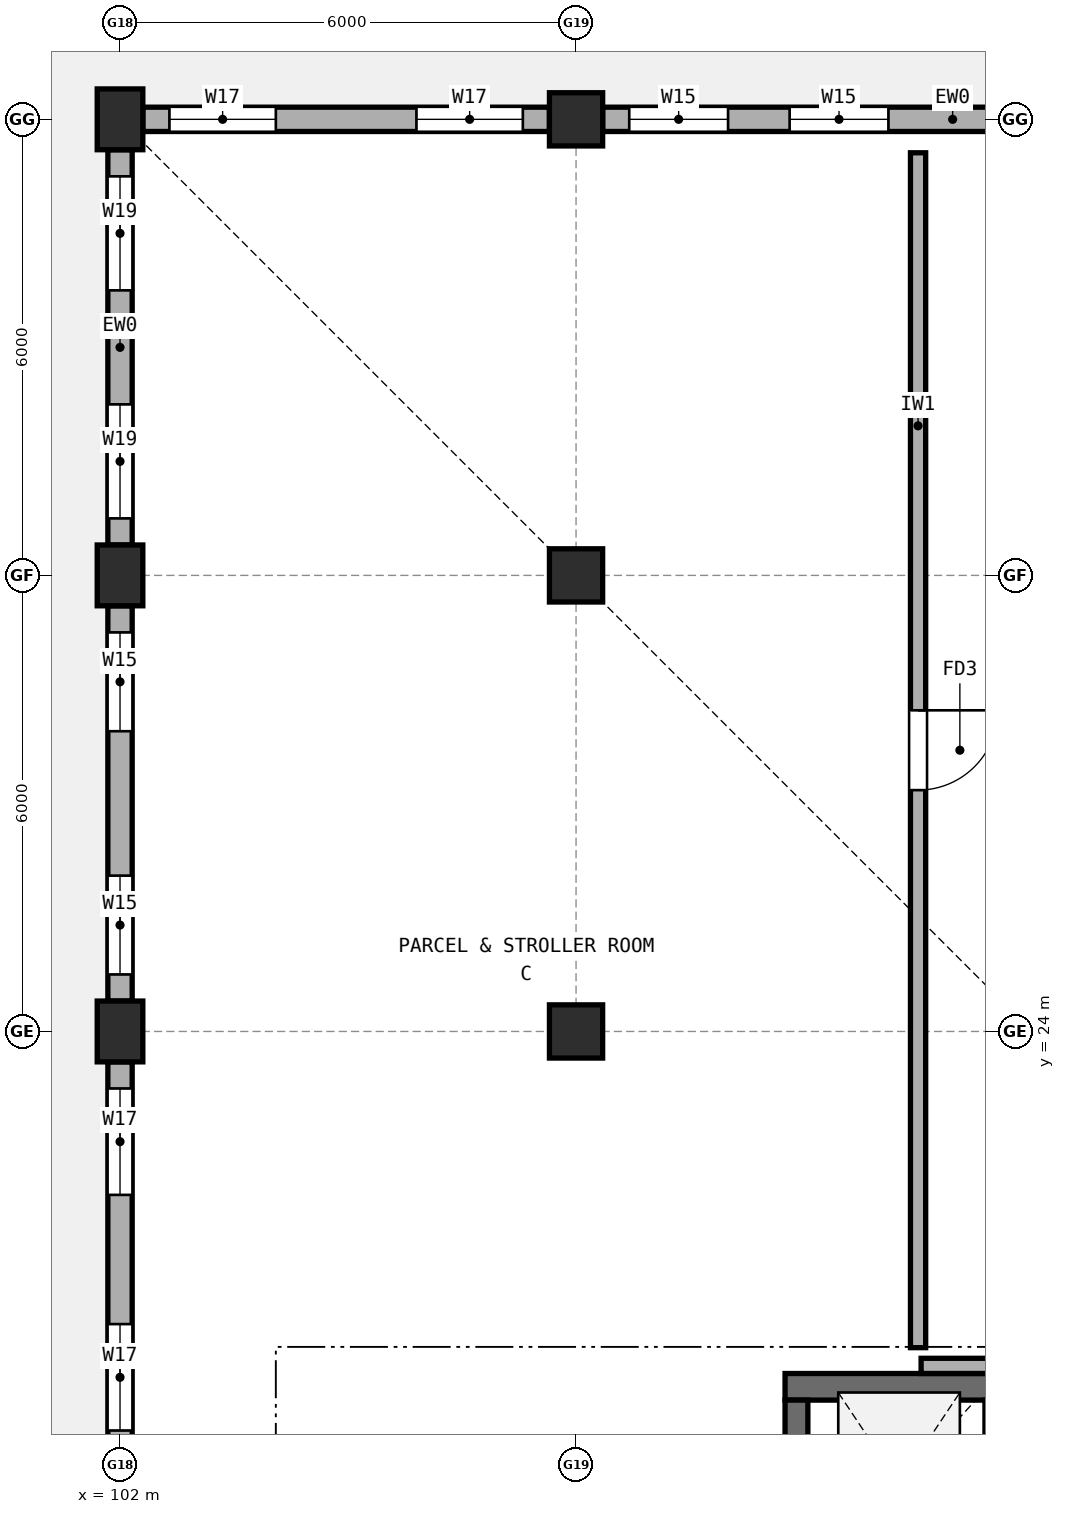
"""IFC4 building model, lengths in metres.
Left out: names, types, materials, properties, quantities, classifications, styles, units other than length and angle.
Written with IfcOpenShell. Run it as: python <this file> out.ifc"""

import sys

from ifc_helpers import new_model, si_unit, direction, frame, frame_2d, origin, origin_2d, place, context, subcontext, project, spatial, rectangle, extrude, element, fill, save


model = new_model("IFC4")
c1 = context("Model", 3, precision=1e-05, world=origin(), true_north=direction((0.0, 1.0)))
c2 = subcontext(c1, "Body", "Model", "MODEL_VIEW")
j1 = project(units=[si_unit("LENGTHUNIT", "METRE"), si_unit("PLANEANGLEUNIT", "RADIAN")], contexts=[c1])
p1 = place(None, origin())
s1 = spatial("IfcSite", under=j1, at=p1, CompositionType="ELEMENT")
p2 = place(p1, origin())
s2 = spatial("IfcBuilding", under=s1, at=p2, CompositionType="ELEMENT")
p3 = place(p2, origin())
s3 = spatial("IfcBuildingStorey", under=s2, at=p3, CompositionType="ELEMENT", Elevation=0.0)
for number, where, z_axis, x_axis in (
    (1, (102.0, 24.0, 0.0), (0.0, 0.0, 1.0), (1.0, 0.0, 0.0)),
    (2, (102.0, 30.0, 0.0), (0.0, 0.0, 1.0), (1.0, 0.0, 0.0)),
    (3, (102.0, 36.0, 0.0), (0.0, 0.0, 1.0), (1.0, 0.0, 0.0)),
):
    element("IfcColumn", number, at=place(p3, frame(where, z_axis=z_axis, x_axis=x_axis)), inside=s3, PredefinedType="COLUMN", context=c2, shape_type="SweptSolid", body=[
        extrude(rectangle(XDim=0.6, YDim=0.8, at=origin_2d()), origin(), (0.0, 0.0, 1.0), 4.23),
    ])
for number, where, z_axis, x_axis in (
    (4, (108.0, 24.0, 0.0), (0.0, 0.0, 1.0), (1.0, 0.0, 0.0)),
    (5, (108.0, 30.0, 0.0), (0.0, 0.0, 1.0), (1.0, 0.0, 0.0)),
    (6, (108.0, 36.0, 0.0), (0.0, 0.0, 1.0), (1.0, 0.0, 0.0)),
):
    element("IfcColumn", number, at=place(p3, frame(where, z_axis=z_axis, x_axis=x_axis)), inside=s3, PredefinedType="COLUMN", context=c2, shape_type="SweptSolid", body=[
        extrude(rectangle(XDim=0.7, YDim=0.7, at=origin_2d()), origin(), (0.0, 0.0, 1.0), 4.23),
    ])
p4 = place(p3, frame((113.65, 36.0, 0.0), z_axis=(0.0, 0.0, 1.0), x_axis=(-1.0, 0.0, 0.0)))
e7 = element("IfcWall", 7, at=p4, inside=s3, PredefinedType="STANDARD", context=c2, shape_type="SweptSolid", body=[
    extrude(rectangle(XDim=5.3, YDim=0.32, at=frame_2d((2.65, 0.0))), origin(), (0.0, 0.0, 1.0), 3.112),
])
p5 = place(p4, frame((1.54, 0.0, 0.9)))
e8 = element("IfcOpeningElement", 8, at=p5, cuts=e7, PredefinedType="OPENING", context=c2, shape_type="SweptSolid", body=[
    extrude(rectangle(XDim=1.3, YDim=1.45, at=frame_2d((0.65, 0.725))), frame((0.0, 0.17, 0.0), z_axis=(0.0, -1.0, 0.0), x_axis=(1.0, 0.0, 0.0)), (0.0, 0.0, 1.0), 0.34),
])
p6 = place(p4, frame((3.65, 0.0, 0.9)))
e9 = element("IfcOpeningElement", 9, at=p6, cuts=e7, PredefinedType="OPENING", context=c2, shape_type="SweptSolid", body=[
    extrude(rectangle(XDim=1.3, YDim=1.45, at=frame_2d((0.65, 0.725))), frame((0.0, 0.17, 0.0), z_axis=(0.0, -1.0, 0.0), x_axis=(1.0, 0.0, 0.0)), (0.0, 0.0, 1.0), 0.34),
])
p7 = place(p3, frame((107.65, 36.0, 0.0), z_axis=(0.0, 0.0, 1.0), x_axis=(-1.0, 0.0, 0.0)))
e10 = element("IfcWall", 10, at=p7, inside=s3, PredefinedType="STANDARD", context=c2, shape_type="SweptSolid", body=[
    extrude(rectangle(XDim=5.35, YDim=0.32, at=frame_2d((2.675, 0.0))), origin(), (0.0, 0.0, 1.0), 3.112),
])
p8 = place(p7, frame((0.35, 0.0, 0.9)))
e11 = element("IfcOpeningElement", 11, at=p8, cuts=e10, PredefinedType="OPENING", context=c2, shape_type="SweptSolid", body=[
    extrude(rectangle(XDim=1.4, YDim=1.5, at=frame_2d((0.7, 0.75))), frame((0.0, 0.17, 0.0), z_axis=(0.0, -1.0, 0.0), x_axis=(1.0, 0.0, 0.0)), (0.0, 0.0, 1.0), 0.34),
])
p9 = place(p7, frame((3.6, 0.0, 0.9)))
e12 = element("IfcOpeningElement", 12, at=p9, cuts=e10, PredefinedType="OPENING", context=c2, shape_type="SweptSolid", body=[
    extrude(rectangle(XDim=1.4, YDim=1.5, at=frame_2d((0.7, 0.75))), frame((0.0, 0.17, 0.0), z_axis=(0.0, -1.0, 0.0), x_axis=(1.0, 0.0, 0.0)), (0.0, 0.0, 1.0), 0.34),
])
p10 = place(p3, frame((102.0, 35.6, 0.0), z_axis=(0.0, 0.0, 1.0), x_axis=(0.0, -1.0, 0.0)))
e13 = element("IfcWall", 13, at=p10, inside=s3, PredefinedType="STANDARD", context=c2, shape_type="SweptSolid", body=[
    extrude(rectangle(XDim=5.2, YDim=0.32, at=frame_2d((2.6, 0.0))), origin(), (0.0, 0.0, 1.0), 3.712),
])
p11 = place(p10, frame((0.35, 0.0, 0.9)))
e14 = element("IfcOpeningElement", 14, at=p11, cuts=e13, PredefinedType="OPENING", context=c2, shape_type="SweptSolid", body=[
    extrude(rectangle(XDim=1.5, YDim=1.5, at=frame_2d((0.75, 0.75))), frame((0.0, 0.17, 0.0), z_axis=(0.0, -1.0, 0.0), x_axis=(1.0, 0.0, 0.0)), (0.0, 0.0, 1.0), 0.34),
])
p12 = place(p10, frame((3.35, 0.0, 0.9)))
e15 = element("IfcOpeningElement", 15, at=p12, cuts=e13, PredefinedType="OPENING", context=c2, shape_type="SweptSolid", body=[
    extrude(rectangle(XDim=1.5, YDim=1.5, at=frame_2d((0.75, 0.75))), frame((0.0, 0.17, 0.0), z_axis=(0.0, -1.0, 0.0), x_axis=(1.0, 0.0, 0.0)), (0.0, 0.0, 1.0), 0.34),
])
p13 = place(p3, frame((102.0, 29.6, 0.0), z_axis=(0.0, 0.0, 1.0), x_axis=(0.0, -1.0, 0.0)))
e16 = element("IfcWall", 16, at=p13, inside=s3, PredefinedType="STANDARD", context=c2, shape_type="SweptSolid", body=[
    extrude(rectangle(XDim=5.2, YDim=0.32, at=frame_2d((2.6, 0.0))), origin(), (0.0, 0.0, 1.0), 3.712),
])
p14 = place(p13, frame((0.35, 0.0, 0.9)))
e17 = element("IfcOpeningElement", 17, at=p14, cuts=e16, PredefinedType="OPENING", context=c2, shape_type="SweptSolid", body=[
    extrude(rectangle(XDim=1.3, YDim=1.45, at=frame_2d((0.65, 0.725))), frame((0.0, 0.17, 0.0), z_axis=(0.0, -1.0, 0.0), x_axis=(1.0, 0.0, 0.0)), (0.0, 0.0, 1.0), 0.34),
])
p15 = place(p13, frame((3.55, 0.0, 0.9)))
e18 = element("IfcOpeningElement", 18, at=p15, cuts=e16, PredefinedType="OPENING", context=c2, shape_type="SweptSolid", body=[
    extrude(rectangle(XDim=1.3, YDim=1.45, at=frame_2d((0.65, 0.725))), frame((0.0, 0.17, 0.0), z_axis=(0.0, -1.0, 0.0), x_axis=(1.0, 0.0, 0.0)), (0.0, 0.0, 1.0), 0.34),
])
p16 = place(p3, frame((102.0, 23.6, 0.0), z_axis=(0.0, 0.0, 1.0), x_axis=(0.0, -1.0, 0.0)))
e19 = element("IfcWall", 19, at=p16, inside=s3, PredefinedType="STANDARD", context=c2, shape_type="SweptSolid", body=[
    extrude(rectangle(XDim=5.2, YDim=0.32, at=frame_2d((2.6, 0.0))), origin(), (0.0, 0.0, 1.0), 3.712),
])
p17 = place(p16, frame((0.35, 0.0, 0.9)))
e20 = element("IfcOpeningElement", 20, at=p17, cuts=e19, PredefinedType="OPENING", context=c2, shape_type="SweptSolid", body=[
    extrude(rectangle(XDim=1.4, YDim=1.5, at=frame_2d((0.7, 0.75))), frame((0.0, 0.17, 0.0), z_axis=(0.0, -1.0, 0.0), x_axis=(1.0, 0.0, 0.0)), (0.0, 0.0, 1.0), 0.34),
])
p18 = place(p16, frame((3.45, 0.0, 0.9)))
e21 = element("IfcOpeningElement", 21, at=p18, cuts=e19, PredefinedType="OPENING", context=c2, shape_type="SweptSolid", body=[
    extrude(rectangle(XDim=1.4, YDim=1.5, at=frame_2d((0.7, 0.75))), frame((0.0, 0.17, 0.0), z_axis=(0.0, -1.0, 0.0), x_axis=(1.0, 0.0, 0.0)), (0.0, 0.0, 1.0), 0.34),
])
p19 = place(p3, frame((115.8, 19.325, 0.0), z_axis=(0.0, 0.0, 1.0), x_axis=(-1.0, 0.0, 0.0)))
e22 = element("IfcWall", 22, at=p19, inside=s3, PredefinedType="SHEAR", context=c2, shape_type="SweptSolid", body=[
    extrude(rectangle(XDim=5.05, YDim=0.35, at=frame_2d((2.525, 0.0))), origin(), (0.0, 0.0, 1.0), 4.23),
])
p20 = place(p3, frame((110.9, 15.8, 0.0), z_axis=(0.0, 0.0, 1.0), x_axis=(0.0, 1.0, 0.0)))
e23 = element("IfcWall", 23, at=p20, inside=s3, PredefinedType="SHEAR", context=c2, shape_type="SweptSolid", body=[
    extrude(rectangle(XDim=3.35, YDim=0.3, at=frame_2d((1.675, 0.0))), origin(), (0.0, 0.0, 1.0), 4.23),
])
p21 = place(p3, frame((113.47, 16.94, 0.0), z_axis=(0.0, 0.0, 1.0), x_axis=(0.0, 1.0, 0.0)))
e24 = element("IfcWall", 24, at=p21, inside=s3, PredefinedType="SOLIDWALL", context=c2, shape_type="SweptSolid", body=[
    extrude(rectangle(XDim=2.21, YDim=0.18, at=frame_2d((1.105, 0.0))), origin(), (0.0, 0.0, 1.0), 4.23),
])
p22 = place(p3, frame((112.54, 19.6, 0.0), z_axis=(0.0, 0.0, 1.0), x_axis=(1.0, 0.0, 0.0)))
e25 = element("IfcWall", 25, at=p22, inside=s3, PredefinedType="SOLIDWALL", context=c2, shape_type="SweptSolid", body=[
    extrude(rectangle(XDim=3.37, YDim=0.2, at=frame_2d((1.685, 0.0))), origin(), (0.0, 0.0, 1.0), 2.912),
])
p23 = place(p3, frame((112.5, 19.84, 0.0), z_axis=(0.0, 0.0, 1.0), x_axis=(0.0, 1.0, 0.0)))
e26 = element("IfcWall", 26, at=p23, inside=s3, PredefinedType="SOLIDWALL", context=c2, shape_type="SweptSolid", body=[
    extrude(rectangle(XDim=15.72, YDim=0.2, at=frame_2d((7.86, 0.0))), origin(), (0.0, 0.0, 1.0), 3.562),
])
p24 = place(p23, frame((7.335, 0.0, 0.0)))
e27 = element("IfcOpeningElement", 27, at=p24, cuts=e26, PredefinedType="OPENING", context=c2, shape_type="SweptSolid", body=[
    extrude(rectangle(XDim=1.05, YDim=2.15, at=frame_2d((0.525, 1.075))), frame((0.0, 0.11, 0.0), z_axis=(0.0, -1.0, 0.0), x_axis=(1.0, 0.0, 0.0)), (0.0, 0.0, 1.0), 0.22),
])
p25 = place(p5, origin())
e28 = element("IfcWindow", 28, at=p25, inside=s3, PartitioningType="SINGLE_PANEL", PredefinedType="WINDOW", context=c2, shape_type="SweptSolid", body=[
    extrude(rectangle(XDim=1.3, YDim=1.45, at=frame_2d((0.65, 0.725))), frame((0.0, 0.03, 0.0), z_axis=(0.0, -1.0, 0.0), x_axis=(1.0, 0.0, 0.0)), (0.0, 0.0, 1.0), 0.06),
])
fill(e8, e28)
p26 = place(p6, origin())
e29 = element("IfcWindow", 29, at=p26, inside=s3, PartitioningType="SINGLE_PANEL", PredefinedType="WINDOW", context=c2, shape_type="SweptSolid", body=[
    extrude(rectangle(XDim=1.3, YDim=1.45, at=frame_2d((0.65, 0.725))), frame((0.0, 0.03, 0.0), z_axis=(0.0, -1.0, 0.0), x_axis=(1.0, 0.0, 0.0)), (0.0, 0.0, 1.0), 0.06),
])
fill(e9, e29)
p27 = place(p8, origin())
e30 = element("IfcWindow", 30, at=p27, inside=s3, PartitioningType="SINGLE_PANEL", PredefinedType="WINDOW", context=c2, shape_type="SweptSolid", body=[
    extrude(rectangle(XDim=1.4, YDim=1.5, at=frame_2d((0.7, 0.75))), frame((0.0, 0.03, 0.0), z_axis=(0.0, -1.0, 0.0), x_axis=(1.0, 0.0, 0.0)), (0.0, 0.0, 1.0), 0.06),
])
fill(e11, e30)
p28 = place(p9, origin())
e31 = element("IfcWindow", 31, at=p28, inside=s3, PartitioningType="SINGLE_PANEL", PredefinedType="WINDOW", context=c2, shape_type="SweptSolid", body=[
    extrude(rectangle(XDim=1.4, YDim=1.5, at=frame_2d((0.7, 0.75))), frame((0.0, 0.03, 0.0), z_axis=(0.0, -1.0, 0.0), x_axis=(1.0, 0.0, 0.0)), (0.0, 0.0, 1.0), 0.06),
])
fill(e12, e31)
p29 = place(p11, origin())
e32 = element("IfcWindow", 32, at=p29, inside=s3, PartitioningType="SINGLE_PANEL", PredefinedType="WINDOW", context=c2, shape_type="SweptSolid", body=[
    extrude(rectangle(XDim=1.5, YDim=1.5, at=frame_2d((0.75, 0.75))), frame((0.0, 0.03, 0.0), z_axis=(0.0, -1.0, 0.0), x_axis=(1.0, 0.0, 0.0)), (0.0, 0.0, 1.0), 0.06),
])
fill(e14, e32)
p30 = place(p12, origin())
e33 = element("IfcWindow", 33, at=p30, inside=s3, PartitioningType="SINGLE_PANEL", PredefinedType="WINDOW", context=c2, shape_type="SweptSolid", body=[
    extrude(rectangle(XDim=1.5, YDim=1.5, at=frame_2d((0.75, 0.75))), frame((0.0, 0.03, 0.0), z_axis=(0.0, -1.0, 0.0), x_axis=(1.0, 0.0, 0.0)), (0.0, 0.0, 1.0), 0.06),
])
fill(e15, e33)
p31 = place(p14, origin())
e34 = element("IfcWindow", 34, at=p31, inside=s3, PartitioningType="SINGLE_PANEL", PredefinedType="WINDOW", context=c2, shape_type="SweptSolid", body=[
    extrude(rectangle(XDim=1.3, YDim=1.45, at=frame_2d((0.65, 0.725))), frame((0.0, 0.03, 0.0), z_axis=(0.0, -1.0, 0.0), x_axis=(1.0, 0.0, 0.0)), (0.0, 0.0, 1.0), 0.06),
])
fill(e17, e34)
p32 = place(p15, origin())
e35 = element("IfcWindow", 35, at=p32, inside=s3, PartitioningType="SINGLE_PANEL", PredefinedType="WINDOW", context=c2, shape_type="SweptSolid", body=[
    extrude(rectangle(XDim=1.3, YDim=1.45, at=frame_2d((0.65, 0.725))), frame((0.0, 0.03, 0.0), z_axis=(0.0, -1.0, 0.0), x_axis=(1.0, 0.0, 0.0)), (0.0, 0.0, 1.0), 0.06),
])
fill(e18, e35)
p33 = place(p17, origin())
e36 = element("IfcWindow", 36, at=p33, inside=s3, PartitioningType="SINGLE_PANEL", PredefinedType="WINDOW", context=c2, shape_type="SweptSolid", body=[
    extrude(rectangle(XDim=1.4, YDim=1.5, at=frame_2d((0.7, 0.75))), frame((0.0, 0.03, 0.0), z_axis=(0.0, -1.0, 0.0), x_axis=(1.0, 0.0, 0.0)), (0.0, 0.0, 1.0), 0.06),
])
fill(e20, e36)
p34 = place(p18, origin())
e37 = element("IfcWindow", 37, at=p34, inside=s3, PartitioningType="SINGLE_PANEL", PredefinedType="WINDOW", context=c2, shape_type="SweptSolid", body=[
    extrude(rectangle(XDim=1.4, YDim=1.5, at=frame_2d((0.7, 0.75))), frame((0.0, 0.03, 0.0), z_axis=(0.0, -1.0, 0.0), x_axis=(1.0, 0.0, 0.0)), (0.0, 0.0, 1.0), 0.06),
])
fill(e21, e37)
p35 = place(p24, origin())
e38 = element("IfcDoor", 38, at=p35, inside=s3, OperationType="SINGLE_SWING_RIGHT", PredefinedType="DOOR", context=c2, shape_type="SweptSolid", body=[
    extrude(rectangle(XDim=1.05, YDim=2.15, at=frame_2d((0.525, 1.075))), frame((0.0, 0.025, 0.0), z_axis=(0.0, -1.0, 0.0), x_axis=(1.0, 0.0, 0.0)), (0.0, 0.0, 1.0), 0.05),
])
fill(e27, e38)
save(model, sys.argv[1])
